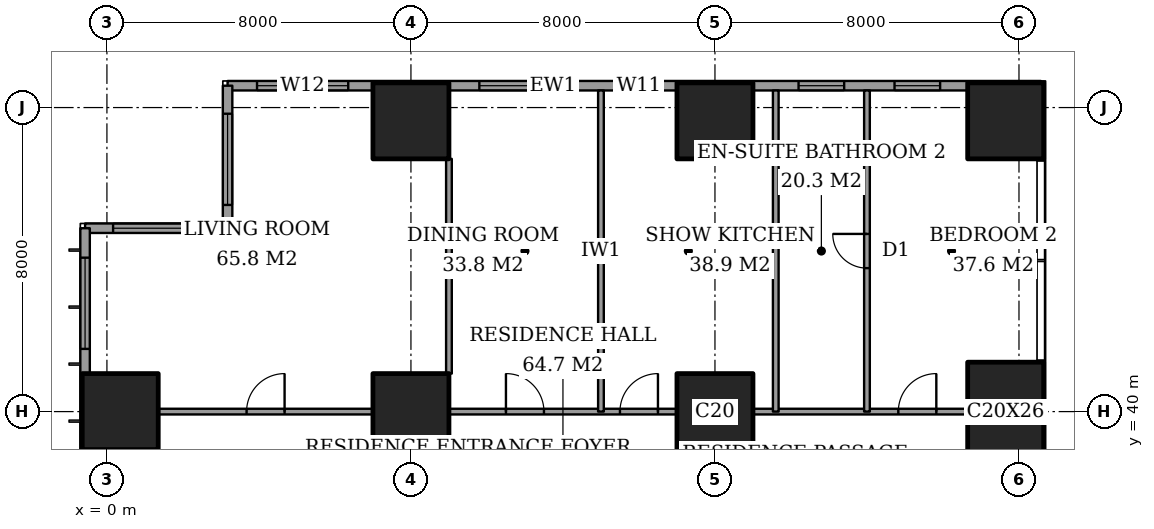
"""IFC4 building model, lengths in metres.
Left out: names, types, materials, properties, quantities, classifications, styles, units other than length and angle.
Written with IfcOpenShell. Run it as: python <this file> out.ifc"""

import sys

from ifc_helpers import new_model, si_unit, direction, frame, frame_2d, origin, origin_2d, place, context, subcontext, project, spatial, rectangle, extrude, element, fill, save


model = new_model("IFC4")
c1 = context("Model", 3, precision=1e-05, world=origin(), true_north=direction((0.0, 1.0)))
c2 = subcontext(c1, "Body", "Model", "MODEL_VIEW")
j1 = project(units=[si_unit("LENGTHUNIT", "METRE"), si_unit("PLANEANGLEUNIT", "RADIAN")], contexts=[c1])
p1 = place(None, origin())
s1 = spatial("IfcSite", under=j1, at=p1, CompositionType="ELEMENT")
p2 = place(p1, origin())
s2 = spatial("IfcBuilding", under=s1, at=p2, CompositionType="ELEMENT")
p3 = place(p2, frame((0.0, 0.0, 157.4)))
s3 = spatial("IfcBuildingStorey", under=s2, at=p3, CompositionType="ELEMENT", Elevation=157.4)
for number, where, z_axis, x_axis in (
    (1, (0.35, 40.0, 0.0), (0.0, 0.0, 1.0), (1.0, 0.0, 0.0)),
    (2, (8.0, 40.0, 0.0), (0.0, 0.0, 1.0), (1.0, 0.0, 0.0)),
    (3, (8.0, 47.65, 0.0), (0.0, 0.0, 1.0), (1.0, 0.0, 0.0)),
    (4, (16.0, 40.0, 0.0), (0.0, 0.0, 1.0), (1.0, 0.0, 0.0)),
    (5, (16.0, 47.65, 0.0), (0.0, 0.0, 1.0), (1.0, 0.0, 0.0)),
):
    element("IfcColumn", number, at=place(p3, frame(where, z_axis=z_axis, x_axis=x_axis)), inside=s3, PredefinedType="COLUMN", context=c2, shape_type="SweptSolid", body=[
        extrude(rectangle(XDim=2.0, YDim=2.0, at=origin_2d()), origin(), (0.0, 0.0, 1.0), 3.6),
    ])
p4 = place(p3, frame((23.65, 40.0, 0.0), z_axis=(0.0, 0.0, 1.0), x_axis=(1.0, 0.0, 0.0)))
e6 = element("IfcColumn", 6, at=p4, inside=s3, PredefinedType="COLUMN", context=c2, shape_type="SweptSolid", body=[
    extrude(rectangle(XDim=2.0, YDim=2.6, at=origin_2d()), origin(), (0.0, 0.0, 1.0), 3.6),
])
p5 = place(p3, frame((23.65, 47.65, 0.0), z_axis=(0.0, 0.0, 1.0), x_axis=(1.0, 0.0, 0.0)))
e7 = element("IfcColumn", 7, at=p5, inside=s3, PredefinedType="COLUMN", context=c2, shape_type="SweptSolid", body=[
    extrude(rectangle(XDim=2.0, YDim=2.0, at=origin_2d()), origin(), (0.0, 0.0, 1.0), 3.6),
])
p6 = place(p3, frame((24.575, 48.575, 0.0), z_axis=(0.0, 0.0, 1.0), x_axis=(-1.0, 0.0, 0.0)))
e8 = element("IfcWall", 8, at=p6, inside=s3, PredefinedType="SOLIDWALL", context=c2, shape_type="SweptSolid", body=[
    extrude(rectangle(XDim=21.4, YDim=0.25, at=frame_2d((10.7, 0.0))), origin(), (0.0, 0.0, 1.0), 3.6),
])
p7 = place(p6, frame((2.65, 0.0, 0.4)))
e9 = element("IfcOpeningElement", 9, at=p7, cuts=e8, PredefinedType="OPENING", context=c2, shape_type="SweptSolid", body=[
    extrude(rectangle(XDim=1.2, YDim=2.2, at=frame_2d((0.6, 1.1))), frame((0.0, 0.135, 0.0), z_axis=(0.0, -1.0, 0.0), x_axis=(1.0, 0.0, 0.0)), (0.0, 0.0, 1.0), 0.27),
])
p8 = place(p6, frame((5.175, 0.0, 0.4)))
e10 = element("IfcOpeningElement", 10, at=p8, cuts=e8, PredefinedType="OPENING", context=c2, shape_type="SweptSolid", body=[
    extrude(rectangle(XDim=1.2, YDim=2.2, at=frame_2d((0.6, 1.1))), frame((0.0, 0.135, 0.0), z_axis=(0.0, -1.0, 0.0), x_axis=(1.0, 0.0, 0.0)), (0.0, 0.0, 1.0), 0.27),
])
p9 = place(p6, frame((9.975, 0.0, 0.4)))
e11 = element("IfcOpeningElement", 11, at=p9, cuts=e8, PredefinedType="OPENING", context=c2, shape_type="SweptSolid", body=[
    extrude(rectangle(XDim=1.2, YDim=2.2, at=frame_2d((0.6, 1.1))), frame((0.0, 0.135, 0.0), z_axis=(0.0, -1.0, 0.0), x_axis=(1.0, 0.0, 0.0)), (0.0, 0.0, 1.0), 0.27),
])
p10 = place(p6, frame((12.375, 0.0, 0.4)))
e12 = element("IfcOpeningElement", 12, at=p10, cuts=e8, PredefinedType="OPENING", context=c2, shape_type="SweptSolid", body=[
    extrude(rectangle(XDim=2.4, YDim=2.2, at=frame_2d((1.2, 1.1))), frame((0.0, 0.135, 0.0), z_axis=(0.0, -1.0, 0.0), x_axis=(1.0, 0.0, 0.0)), (0.0, 0.0, 1.0), 0.27),
])
p11 = place(p6, frame((18.225, 0.0, 0.4)))
e13 = element("IfcOpeningElement", 13, at=p11, cuts=e8, PredefinedType="OPENING", context=c2, shape_type="SweptSolid", body=[
    extrude(rectangle(XDim=2.4, YDim=2.2, at=frame_2d((1.2, 1.1))), frame((0.0, 0.135, 0.0), z_axis=(0.0, -1.0, 0.0), x_axis=(1.0, 0.0, 0.0)), (0.0, 0.0, 1.0), 0.27),
])
p12 = place(p3, frame((3.175, 48.575, 0.0), z_axis=(0.0, 0.0, 1.0), x_axis=(0.0, -1.0, 0.0)))
e14 = element("IfcWall", 14, at=p12, inside=s3, PredefinedType="SOLIDWALL", context=c2, shape_type="SweptSolid", body=[
    extrude(rectangle(XDim=3.75, YDim=0.25, at=frame_2d((1.875, 0.0))), origin(), (0.0, 0.0, 1.0), 3.6),
])
p13 = place(p12, frame((0.738, 0.0, 0.4)))
e15 = element("IfcOpeningElement", 15, at=p13, cuts=e14, PredefinedType="OPENING", context=c2, shape_type="SweptSolid", body=[
    extrude(rectangle(XDim=2.4, YDim=2.2, at=frame_2d((1.2, 1.1))), frame((0.0, 0.135, 0.0), z_axis=(0.0, -1.0, 0.0), x_axis=(1.0, 0.0, 0.0)), (0.0, 0.0, 1.0), 0.27),
])
p14 = place(p3, frame((3.175, 44.825, 0.0), z_axis=(0.0, 0.0, 1.0), x_axis=(-1.0, 0.0, 0.0)))
e16 = element("IfcWall", 16, at=p14, inside=s3, PredefinedType="SOLIDWALL", context=c2, shape_type="SweptSolid", body=[
    extrude(rectangle(XDim=3.75, YDim=0.25, at=frame_2d((1.875, 0.0))), origin(), (0.0, 0.0, 1.0), 3.6),
])
p15 = place(p14, frame((0.613, 0.0, 0.4)))
e17 = element("IfcOpeningElement", 17, at=p15, cuts=e16, PredefinedType="OPENING", context=c2, shape_type="SweptSolid", body=[
    extrude(rectangle(XDim=2.4, YDim=2.2, at=frame_2d((1.2, 1.1))), frame((0.0, 0.135, 0.0), z_axis=(0.0, -1.0, 0.0), x_axis=(1.0, 0.0, 0.0)), (0.0, 0.0, 1.0), 0.27),
])
p16 = place(p3, frame((-0.575, 44.825, 0.0), z_axis=(0.0, 0.0, 1.0), x_axis=(0.0, -1.0, 0.0)))
e18 = element("IfcWall", 18, at=p16, inside=s3, PredefinedType="SOLIDWALL", context=c2, shape_type="SweptSolid", body=[
    extrude(rectangle(XDim=41.65, YDim=0.25, at=frame_2d((20.825, 0.0))), origin(), (0.0, 0.0, 1.0), 3.6),
])
p17 = place(p16, frame((0.775, 0.0, 0.4)))
e19 = element("IfcOpeningElement", 19, at=p17, cuts=e18, PredefinedType="OPENING", context=c2, shape_type="SweptSolid", body=[
    extrude(rectangle(XDim=2.4, YDim=2.2, at=frame_2d((1.2, 1.1))), frame((0.0, 0.135, 0.0), z_axis=(0.0, -1.0, 0.0), x_axis=(1.0, 0.0, 0.0)), (0.0, 0.0, 1.0), 0.27),
])
p18 = place(p16, frame((6.1, 0.0, 0.4)))
e20 = element("IfcOpeningElement", 20, at=p18, cuts=e18, PredefinedType="OPENING", context=c2, shape_type="SweptSolid", body=[
    extrude(rectangle(XDim=1.2, YDim=2.2, at=frame_2d((0.6, 1.1))), frame((0.0, 0.135, 0.0), z_axis=(0.0, -1.0, 0.0), x_axis=(1.0, 0.0, 0.0)), (0.0, 0.0, 1.0), 0.27),
])
p19 = place(p16, frame((8.425, 0.0, 0.4)))
e21 = element("IfcOpeningElement", 21, at=p19, cuts=e18, PredefinedType="OPENING", context=c2, shape_type="SweptSolid", body=[
    extrude(rectangle(XDim=2.4, YDim=2.2, at=frame_2d((1.2, 1.1))), frame((0.0, 0.135, 0.0), z_axis=(0.0, -1.0, 0.0), x_axis=(1.0, 0.0, 0.0)), (0.0, 0.0, 1.0), 0.27),
])
p20 = place(p16, frame((15.625, 0.0, 0.4)))
e22 = element("IfcOpeningElement", 22, at=p20, cuts=e18, PredefinedType="OPENING", context=c2, shape_type="SweptSolid", body=[
    extrude(rectangle(XDim=2.4, YDim=2.2, at=frame_2d((1.2, 1.1))), frame((0.0, 0.135, 0.0), z_axis=(0.0, -1.0, 0.0), x_axis=(1.0, 0.0, 0.0)), (0.0, 0.0, 1.0), 0.27),
])
p21 = place(p16, frame((23.625, 0.0, 0.4)))
e23 = element("IfcOpeningElement", 23, at=p21, cuts=e18, PredefinedType="OPENING", context=c2, shape_type="SweptSolid", body=[
    extrude(rectangle(XDim=2.4, YDim=2.2, at=frame_2d((1.2, 1.1))), frame((0.0, 0.135, 0.0), z_axis=(0.0, -1.0, 0.0), x_axis=(1.0, 0.0, 0.0)), (0.0, 0.0, 1.0), 0.27),
])
p22 = place(p16, frame((30.825, 0.0, 0.4)))
e24 = element("IfcOpeningElement", 24, at=p22, cuts=e18, PredefinedType="OPENING", context=c2, shape_type="SweptSolid", body=[
    extrude(rectangle(XDim=2.4, YDim=2.2, at=frame_2d((1.2, 1.1))), frame((0.0, 0.135, 0.0), z_axis=(0.0, -1.0, 0.0), x_axis=(1.0, 0.0, 0.0)), (0.0, 0.0, 1.0), 0.27),
])
p23 = place(p16, frame((34.5, 0.0, 0.4)))
e25 = element("IfcOpeningElement", 25, at=p23, cuts=e18, PredefinedType="OPENING", context=c2, shape_type="SweptSolid", body=[
    extrude(rectangle(XDim=1.2, YDim=2.2, at=frame_2d((0.6, 1.1))), frame((0.0, 0.135, 0.0), z_axis=(0.0, -1.0, 0.0), x_axis=(1.0, 0.0, 0.0)), (0.0, 0.0, 1.0), 0.27),
])
p24 = place(p16, frame((38.475, 0.0, 0.4)))
e26 = element("IfcOpeningElement", 26, at=p24, cuts=e18, PredefinedType="OPENING", context=c2, shape_type="SweptSolid", body=[
    extrude(rectangle(XDim=2.4, YDim=2.2, at=frame_2d((1.2, 1.1))), frame((0.0, 0.135, 0.0), z_axis=(0.0, -1.0, 0.0), x_axis=(1.0, 0.0, 0.0)), (0.0, 0.0, 1.0), 0.27),
])
p25 = place(p3, frame((1.35, 40.0, 0.0), z_axis=(0.0, 0.0, 1.0), x_axis=(1.0, 0.0, 0.0)))
e27 = element("IfcWall", 27, at=p25, inside=s3, PredefinedType="PARTITIONING", context=c2, shape_type="SweptSolid", body=[
    extrude(rectangle(XDim=5.65, YDim=0.15, at=frame_2d((2.825, 0.0))), origin(), (0.0, 0.0, 1.0), 3.35),
])
p26 = place(p25, frame((2.325, 0.0, 0.0)))
e28 = element("IfcOpeningElement", 28, at=p26, cuts=e27, PredefinedType="OPENING", context=c2, shape_type="SweptSolid", body=[
    extrude(rectangle(XDim=1.0, YDim=2.1, at=frame_2d((0.5, 1.05))), frame((0.0, 0.085, 0.0), z_axis=(0.0, -1.0, 0.0), x_axis=(1.0, 0.0, 0.0)), (0.0, 0.0, 1.0), 0.17),
])
p27 = place(p3, frame((9.0, 40.0, 0.0), z_axis=(0.0, 0.0, 1.0), x_axis=(1.0, 0.0, 0.0)))
e29 = element("IfcWall", 29, at=p27, inside=s3, PredefinedType="PARTITIONING", context=c2, shape_type="SweptSolid", body=[
    extrude(rectangle(XDim=6.0, YDim=0.15, at=frame_2d((3.0, 0.0))), origin(), (0.0, 0.0, 1.0), 3.35),
])
p28 = place(p27, frame((1.5, 0.0, 0.0)))
e30 = element("IfcOpeningElement", 30, at=p28, cuts=e29, PredefinedType="OPENING", context=c2, shape_type="SweptSolid", body=[
    extrude(rectangle(XDim=1.0, YDim=2.1, at=frame_2d((0.5, 1.05))), frame((0.0, 0.085, 0.0), z_axis=(0.0, -1.0, 0.0), x_axis=(1.0, 0.0, 0.0)), (0.0, 0.0, 1.0), 0.17),
])
p29 = place(p27, frame((4.5, 0.0, 0.0)))
e31 = element("IfcOpeningElement", 31, at=p29, cuts=e29, PredefinedType="OPENING", context=c2, shape_type="SweptSolid", body=[
    extrude(rectangle(XDim=1.0, YDim=2.1, at=frame_2d((0.5, 1.05))), frame((0.0, 0.085, 0.0), z_axis=(0.0, -1.0, 0.0), x_axis=(1.0, 0.0, 0.0)), (0.0, 0.0, 1.0), 0.17),
])
p30 = place(p3, frame((17.0, 40.0, 0.0), z_axis=(0.0, 0.0, 1.0), x_axis=(1.0, 0.0, 0.0)))
e32 = element("IfcWall", 32, at=p30, inside=s3, PredefinedType="PARTITIONING", context=c2, shape_type="SweptSolid", body=[
    extrude(rectangle(XDim=5.65, YDim=0.15, at=frame_2d((2.825, 0.0))), origin(), (0.0, 0.0, 1.0), 3.35),
])
p31 = place(p30, frame((3.825, 0.0, 0.0)))
e33 = element("IfcOpeningElement", 33, at=p31, cuts=e32, PredefinedType="OPENING", context=c2, shape_type="SweptSolid", body=[
    extrude(rectangle(XDim=1.0, YDim=2.1, at=frame_2d((0.5, 1.05))), frame((0.0, 0.085, 0.0), z_axis=(0.0, -1.0, 0.0), x_axis=(1.0, 0.0, 0.0)), (0.0, 0.0, 1.0), 0.17),
])
p32 = place(p3, frame((9.0, 41.0, 0.0), z_axis=(0.0, 0.0, 1.0), x_axis=(0.0, 1.0, 0.0)))
e34 = element("IfcWall", 34, at=p32, inside=s3, PredefinedType="PARTITIONING", context=c2, shape_type="SweptSolid", body=[
    extrude(rectangle(XDim=5.65, YDim=0.15, at=frame_2d((2.825, 0.0))), origin(), (0.0, 0.0, 1.0), 3.35),
])
for number, where, z_axis, x_axis in (
    (35, (13.0, 40.0, 0.0), (0.0, 0.0, 1.0), (0.0, 1.0, 0.0)),
    (36, (17.6, 40.0, 0.0), (0.0, 0.0, 1.0), (0.0, 1.0, 0.0)),
):
    element("IfcWall", number, at=place(p3, frame(where, z_axis=z_axis, x_axis=x_axis)), inside=s3, PredefinedType="PARTITIONING", context=c2, shape_type="SweptSolid", body=[
        extrude(rectangle(XDim=8.45, YDim=0.15, at=frame_2d((4.225, 0.0))), origin(), (0.0, 0.0, 1.0), 3.35),
    ])
p33 = place(p3, frame((20.0, 40.0, 0.0), z_axis=(0.0, 0.0, 1.0), x_axis=(0.0, 1.0, 0.0)))
e37 = element("IfcWall", 37, at=p33, inside=s3, PredefinedType="PARTITIONING", context=c2, shape_type="SweptSolid", body=[
    extrude(rectangle(XDim=8.45, YDim=0.15, at=frame_2d((4.225, 0.0))), origin(), (0.0, 0.0, 1.0), 3.35),
])
p34 = place(p33, frame((3.775, 0.0, 0.0)))
e38 = element("IfcOpeningElement", 38, at=p34, cuts=e37, PredefinedType="OPENING", context=c2, shape_type="SweptSolid", body=[
    extrude(rectangle(XDim=0.9, YDim=2.1, at=frame_2d((0.45, 1.05))), frame((0.0, 0.085, 0.0), z_axis=(0.0, -1.0, 0.0), x_axis=(1.0, 0.0, 0.0)), (0.0, 0.0, 1.0), 0.17),
])
p35 = place(p7, origin())
e39 = element("IfcWindow", 39, at=p35, inside=s3, PartitioningType="SINGLE_PANEL", PredefinedType="WINDOW", context=c2, shape_type="SweptSolid", body=[
    extrude(rectangle(XDim=1.2, YDim=2.2, at=frame_2d((0.6, 1.1))), frame((0.0, 0.03, 0.0), z_axis=(0.0, -1.0, 0.0), x_axis=(1.0, 0.0, 0.0)), (0.0, 0.0, 1.0), 0.06),
])
fill(e9, e39)
p36 = place(p8, origin())
e40 = element("IfcWindow", 40, at=p36, inside=s3, PartitioningType="SINGLE_PANEL", PredefinedType="WINDOW", context=c2, shape_type="SweptSolid", body=[
    extrude(rectangle(XDim=1.2, YDim=2.2, at=frame_2d((0.6, 1.1))), frame((0.0, 0.03, 0.0), z_axis=(0.0, -1.0, 0.0), x_axis=(1.0, 0.0, 0.0)), (0.0, 0.0, 1.0), 0.06),
])
fill(e10, e40)
p37 = place(p9, origin())
e41 = element("IfcWindow", 41, at=p37, inside=s3, PartitioningType="SINGLE_PANEL", PredefinedType="WINDOW", context=c2, shape_type="SweptSolid", body=[
    extrude(rectangle(XDim=1.2, YDim=2.2, at=frame_2d((0.6, 1.1))), frame((0.0, 0.03, 0.0), z_axis=(0.0, -1.0, 0.0), x_axis=(1.0, 0.0, 0.0)), (0.0, 0.0, 1.0), 0.06),
])
fill(e11, e41)
p38 = place(p10, origin())
e42 = element("IfcWindow", 42, at=p38, inside=s3, PartitioningType="SINGLE_PANEL", PredefinedType="WINDOW", context=c2, shape_type="SweptSolid", body=[
    extrude(rectangle(XDim=2.4, YDim=2.2, at=frame_2d((1.2, 1.1))), frame((0.0, 0.03, 0.0), z_axis=(0.0, -1.0, 0.0), x_axis=(1.0, 0.0, 0.0)), (0.0, 0.0, 1.0), 0.06),
])
fill(e12, e42)
p39 = place(p11, origin())
e43 = element("IfcWindow", 43, at=p39, inside=s3, PartitioningType="SINGLE_PANEL", PredefinedType="WINDOW", context=c2, shape_type="SweptSolid", body=[
    extrude(rectangle(XDim=2.4, YDim=2.2, at=frame_2d((1.2, 1.1))), frame((0.0, 0.03, 0.0), z_axis=(0.0, -1.0, 0.0), x_axis=(1.0, 0.0, 0.0)), (0.0, 0.0, 1.0), 0.06),
])
fill(e13, e43)
p40 = place(p13, origin())
e44 = element("IfcWindow", 44, at=p40, inside=s3, PartitioningType="SINGLE_PANEL", PredefinedType="WINDOW", context=c2, shape_type="SweptSolid", body=[
    extrude(rectangle(XDim=2.4, YDim=2.2, at=frame_2d((1.2, 1.1))), frame((0.0, 0.03, 0.0), z_axis=(0.0, -1.0, 0.0), x_axis=(1.0, 0.0, 0.0)), (0.0, 0.0, 1.0), 0.06),
])
fill(e15, e44)
p41 = place(p15, origin())
e45 = element("IfcWindow", 45, at=p41, inside=s3, PartitioningType="SINGLE_PANEL", PredefinedType="WINDOW", context=c2, shape_type="SweptSolid", body=[
    extrude(rectangle(XDim=2.4, YDim=2.2, at=frame_2d((1.2, 1.1))), frame((0.0, 0.03, 0.0), z_axis=(0.0, -1.0, 0.0), x_axis=(1.0, 0.0, 0.0)), (0.0, 0.0, 1.0), 0.06),
])
fill(e17, e45)
p42 = place(p17, origin())
e46 = element("IfcWindow", 46, at=p42, inside=s3, PartitioningType="SINGLE_PANEL", PredefinedType="WINDOW", context=c2, shape_type="SweptSolid", body=[
    extrude(rectangle(XDim=2.4, YDim=2.2, at=frame_2d((1.2, 1.1))), frame((0.0, 0.03, 0.0), z_axis=(0.0, -1.0, 0.0), x_axis=(1.0, 0.0, 0.0)), (0.0, 0.0, 1.0), 0.06),
])
fill(e19, e46)
p43 = place(p26, origin())
e47 = element("IfcDoor", 47, at=p43, inside=s3, OperationType="SINGLE_SWING_LEFT", PredefinedType="DOOR", context=c2, shape_type="SweptSolid", body=[
    extrude(rectangle(XDim=1.0, YDim=2.1, at=frame_2d((0.5, 1.05))), frame((0.0, 0.025, 0.0), z_axis=(0.0, -1.0, 0.0), x_axis=(1.0, 0.0, 0.0)), (0.0, 0.0, 1.0), 0.05),
])
fill(e28, e47)
p44 = place(p28, origin())
e48 = element("IfcDoor", 48, at=p44, inside=s3, OperationType="SINGLE_SWING_RIGHT", PredefinedType="DOOR", context=c2, shape_type="SweptSolid", body=[
    extrude(rectangle(XDim=1.0, YDim=2.1, at=frame_2d((0.5, 1.05))), frame((0.0, 0.025, 0.0), z_axis=(0.0, -1.0, 0.0), x_axis=(1.0, 0.0, 0.0)), (0.0, 0.0, 1.0), 0.05),
])
fill(e30, e48)
p45 = place(p29, origin())
e49 = element("IfcDoor", 49, at=p45, inside=s3, OperationType="SINGLE_SWING_LEFT", PredefinedType="DOOR", context=c2, shape_type="SweptSolid", body=[
    extrude(rectangle(XDim=1.0, YDim=2.1, at=frame_2d((0.5, 1.05))), frame((0.0, 0.025, 0.0), z_axis=(0.0, -1.0, 0.0), x_axis=(1.0, 0.0, 0.0)), (0.0, 0.0, 1.0), 0.05),
])
fill(e31, e49)
p46 = place(p34, origin())
e50 = element("IfcDoor", 50, at=p46, inside=s3, OperationType="SINGLE_SWING_LEFT", PredefinedType="DOOR", context=c2, shape_type="SweptSolid", body=[
    extrude(rectangle(XDim=0.9, YDim=2.1, at=frame_2d((0.45, 1.05))), frame((0.0, 0.025, 0.0), z_axis=(0.0, -1.0, 0.0), x_axis=(1.0, 0.0, 0.0)), (0.0, 0.0, 1.0), 0.05),
])
fill(e38, e50)
p47 = place(p31, origin())
e51 = element("IfcDoor", 51, at=p47, inside=s3, OperationType="SINGLE_SWING_LEFT", PredefinedType="DOOR", context=c2, shape_type="SweptSolid", body=[
    extrude(rectangle(XDim=1.0, YDim=2.1, at=frame_2d((0.5, 1.05))), frame((0.0, 0.025, 0.0), z_axis=(0.0, -1.0, 0.0), x_axis=(1.0, 0.0, 0.0)), (0.0, 0.0, 1.0), 0.05),
])
fill(e33, e51)
save(model, sys.argv[1])
